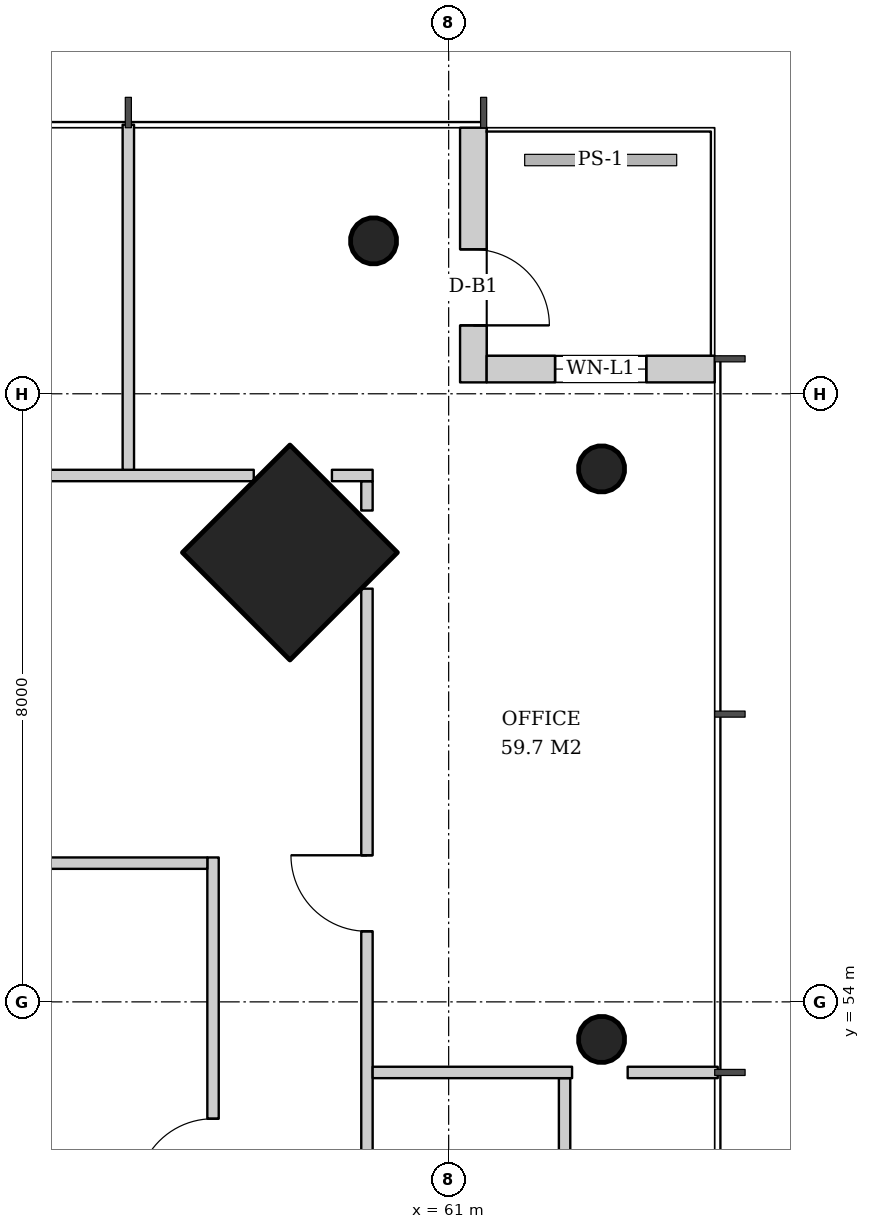
"""IFC4 building model, lengths in metres.
Left out: names, types, materials, properties, quantities, classifications, styles, units other than length and angle.
Written with IfcOpenShell. Run it as: python <this file> out.ifc"""

import sys

from ifc_helpers import new_model, si_unit, direction, frame, frame_2d, origin, origin_2d, place, context, subcontext, project, spatial, rectangle, hollow_circle, extrude, element, fill, save


model = new_model("IFC4")
c1 = context("Model", 3, precision=1e-05, world=origin(), true_north=direction((0.0, 1.0)))
c2 = subcontext(c1, "Body", "Model", "MODEL_VIEW")
j1 = project(units=[si_unit("LENGTHUNIT", "METRE"), si_unit("PLANEANGLEUNIT", "RADIAN")], contexts=[c1])
p1 = place(None, origin())
s1 = spatial("IfcSite", under=j1, at=p1, CompositionType="ELEMENT")
p2 = place(p1, origin())
s2 = spatial("IfcBuilding", under=s1, at=p2, CompositionType="ELEMENT")
p3 = place(p2, frame((0.0, 0.0, 207.2)))
s3 = spatial("IfcBuildingStorey", under=s2, at=p3, CompositionType="ELEMENT", Elevation=207.2)
p4 = place(p3, frame((58.95, 59.95, 0.0), z_axis=(-0.031898107953, -0.031898107953, 0.998981992539), x_axis=(0.707106781187, -0.707106781187, 0.0)))
e1 = element("IfcColumn", 1, at=p4, inside=s3, PredefinedType="COLUMN", context=c2, shape_type="SweptSolid", body=[
    extrude(rectangle(XDim=2.0, YDim=2.0, at=origin_2d()), origin(), (0.0, 0.0, 1.0), 3.804),
])
p5 = place(p3, frame((63.05, 61.05, 0.0), z_axis=(-0.031962158256, -0.031962158256, 0.998977898093), x_axis=(0.707106781187, -0.707106781187, 0.0)))
e2 = element("IfcColumn", 2, at=p5, inside=s3, PredefinedType="COLUMN", context=c2, shape_type="SweptSolid", body=[
    extrude(hollow_circle(Radius=0.305, WallThickness=0.025, at=origin_2d()), origin(), (0.0, 0.0, 1.0), 3.804),
])
p6 = place(p3, frame((63.05, 53.525, 0.0), z_axis=(-0.031974442509, -0.015923015547, 0.999361842679), x_axis=(0.445775033553, -0.895145027055, 0.0)))
e3 = element("IfcColumn", 3, at=p6, inside=s3, PredefinedType="COLUMN", context=c2, shape_type="SweptSolid", body=[
    extrude(hollow_circle(Radius=0.305, WallThickness=0.025, at=origin_2d()), origin(), (0.0, 0.0, 1.0), 3.802),
])
p7 = place(p3, frame((60.05, 64.05, 0.0), z_axis=(-0.031962158256, -0.031962158256, 0.998977898093), x_axis=(0.707106781187, -0.707106781187, 0.0)))
e4 = element("IfcColumn", 4, at=p7, inside=s3, PredefinedType="COLUMN", context=c2, shape_type="SweptSolid", body=[
    extrude(hollow_circle(Radius=0.305, WallThickness=0.025, at=origin_2d()), origin(), (0.0, 0.0, 1.0), 3.804),
])
p8 = place(p3, frame((61.325, 65.5, 0.0), z_axis=(0.0, 0.0, 1.0), x_axis=(0.0, -1.0, 0.0)))
e5 = element("IfcWall", 5, at=p8, inside=s3, PredefinedType="SOLIDWALL", context=c2, shape_type="SweptSolid", body=[
    extrude(rectangle(XDim=3.35, YDim=0.35, at=frame_2d((1.675, 0.0))), origin(), (0.0, 0.0, 1.0), 3.62),
])
p9 = place(p8, frame((1.6, 0.0, 0.0)))
e6 = element("IfcOpeningElement", 6, at=p9, cuts=e5, PredefinedType="OPENING", context=c2, shape_type="SweptSolid", body=[
    extrude(rectangle(XDim=1.0, YDim=2.4, at=frame_2d((0.5, 1.2))), frame((0.0, 0.185, 0.0), z_axis=(0.0, -1.0, 0.0), x_axis=(1.0, 0.0, 0.0)), (0.0, 0.0, 1.0), 0.37),
])
p10 = place(p3, frame((61.5, 62.325, 0.0), z_axis=(0.0, 0.0, 1.0), x_axis=(1.0, 0.0, 0.0)))
e7 = element("IfcWall", 7, at=p10, inside=s3, PredefinedType="SOLIDWALL", context=c2, shape_type="SweptSolid", body=[
    extrude(rectangle(XDim=3.0, YDim=0.35, at=frame_2d((1.5, 0.0))), origin(), (0.0, 0.0, 1.0), 3.62),
])
p11 = place(p10, frame((0.9, 0.0, 0.6)))
e8 = element("IfcOpeningElement", 8, at=p11, cuts=e7, PredefinedType="OPENING", context=c2, shape_type="SweptSolid", body=[
    extrude(rectangle(XDim=1.2, YDim=2.55, at=frame_2d((0.6, 1.275))), frame((0.0, 0.185, 0.0), z_axis=(0.0, -1.0, 0.0), x_axis=(1.0, 0.0, 0.0)), (0.0, 0.0, 1.0), 0.37),
])
p12 = place(p3, frame((57.9, 48.025, 0.0), z_axis=(0.0, 0.0, 1.0), x_axis=(0.0, 1.0, 0.0)))
e9 = element("IfcWall", 9, at=p12, inside=s3, PredefinedType="PARTITIONING", context=c2, shape_type="SweptSolid", body=[
    extrude(rectangle(XDim=7.875, YDim=0.15, at=frame_2d((3.938, 0.0))), origin(), (0.0, 0.0, 1.0), 2.867),
])
p13 = place(p12, frame((3.438, 0.0, 0.0)))
e10 = element("IfcOpeningElement", 10, at=p13, cuts=e9, PredefinedType="OPENING", context=c2, shape_type="SweptSolid", body=[
    extrude(rectangle(XDim=1.0, YDim=2.1, at=frame_2d((0.5, 1.05))), frame((0.0, 0.085, 0.0), z_axis=(0.0, -1.0, 0.0), x_axis=(1.0, 0.0, 0.0)), (0.0, 0.0, 1.0), 0.17),
])
p14 = place(p3, frame((54.9, 55.825, 0.0), z_axis=(0.0, 0.0, 1.0), x_axis=(1.0, 0.0, 0.0)))
e11 = element("IfcWall", 11, at=p14, inside=s3, PredefinedType="PARTITIONING", context=c2, shape_type="SweptSolid", body=[
    extrude(rectangle(XDim=2.925, YDim=0.15, at=frame_2d((1.462, 0.0))), origin(), (0.0, 0.0, 1.0), 3.62),
])
p15 = place(p3, frame((62.525, 48.432, 0.0), z_axis=(0.0, 0.0, 1.0), x_axis=(0.0, 1.0, 0.0)))
e12 = element("IfcWall", 12, at=p15, inside=s3, PredefinedType="PARTITIONING", context=c2, shape_type="SweptSolid", body=[
    extrude(rectangle(XDim=4.564, YDim=0.15, at=frame_2d((2.282, 0.0))), origin(), (0.0, 0.0, 1.0), 2.867),
])
p16 = place(p3, frame((59.925, 32.564, 0.0), z_axis=(0.0, 0.0, 1.0), x_axis=(0.0, 1.0, 0.0)))
e13 = element("IfcWall", 13, at=p16, inside=s3, PredefinedType="PARTITIONING", context=c2, shape_type="SweptSolid", body=[
    extrude(rectangle(XDim=26.872, YDim=0.15, at=frame_2d((13.436, 0.0))), origin(), (0.0, 0.0, 1.0), 2.867),
])
p17 = place(p16, frame((3.507, 0.0, 0.0)))
e14 = element("IfcOpeningElement", 14, at=p17, cuts=e13, PredefinedType="OPENING", context=c2, shape_type="SweptSolid", body=[
    extrude(rectangle(XDim=1.0, YDim=2.1, at=frame_2d((0.5, 1.05))), frame((0.0, 0.085, 0.0), z_axis=(0.0, -1.0, 0.0), x_axis=(1.0, 0.0, 0.0)), (0.0, 0.0, 1.0), 0.17),
])
p18 = place(p16, frame((8.221, 0.0, 0.0)))
e15 = element("IfcOpeningElement", 15, at=p18, cuts=e13, PredefinedType="OPENING", context=c2, shape_type="SweptSolid", body=[
    extrude(rectangle(XDim=1.0, YDim=2.1, at=frame_2d((0.5, 1.05))), frame((0.0, 0.085, 0.0), z_axis=(0.0, -1.0, 0.0), x_axis=(1.0, 0.0, 0.0)), (0.0, 0.0, 1.0), 0.17),
])
p19 = place(p16, frame((12.936, 0.0, 0.0)))
e16 = element("IfcOpeningElement", 16, at=p19, cuts=e13, PredefinedType="OPENING", context=c2, shape_type="SweptSolid", body=[
    extrude(rectangle(XDim=1.0, YDim=2.1, at=frame_2d((0.5, 1.05))), frame((0.0, 0.085, 0.0), z_axis=(0.0, -1.0, 0.0), x_axis=(1.0, 0.0, 0.0)), (0.0, 0.0, 1.0), 0.17),
])
p20 = place(p16, frame((17.65, 0.0, 0.0)))
e17 = element("IfcOpeningElement", 17, at=p20, cuts=e13, PredefinedType="OPENING", context=c2, shape_type="SweptSolid", body=[
    extrude(rectangle(XDim=1.0, YDim=2.1, at=frame_2d((0.5, 1.05))), frame((0.0, 0.085, 0.0), z_axis=(0.0, -1.0, 0.0), x_axis=(1.0, 0.0, 0.0)), (0.0, 0.0, 1.0), 0.17),
])
p21 = place(p16, frame((22.364, 0.0, 0.0)))
e18 = element("IfcOpeningElement", 18, at=p21, cuts=e13, PredefinedType="OPENING", context=c2, shape_type="SweptSolid", body=[
    extrude(rectangle(XDim=1.0, YDim=2.1, at=frame_2d((0.5, 1.05))), frame((0.0, 0.085, 0.0), z_axis=(0.0, -1.0, 0.0), x_axis=(1.0, 0.0, 0.0)), (0.0, 0.0, 1.0), 0.17),
])
p22 = place(p3, frame((59.925, 60.464, 0.0), z_axis=(0.0, 0.0, 1.0), x_axis=(0.0, 1.0, 0.0)))
e19 = element("IfcWall", 19, at=p22, inside=s3, PredefinedType="PARTITIONING", context=c2, shape_type="SweptSolid", body=[
    extrude(rectangle(XDim=0.386, YDim=0.15, at=frame_2d((0.193, 0.0))), origin(), (0.0, 0.0, 1.0), 3.32),
])
p23 = place(p3, frame((60.0, 53.072, 0.0), z_axis=(0.0, 0.0, 1.0), x_axis=(1.0, 0.0, 0.0)))
e20 = element("IfcWall", 20, at=p23, inside=s3, PredefinedType="PARTITIONING", context=c2, shape_type="SweptSolid", body=[
    extrude(rectangle(XDim=2.624, YDim=0.15, at=frame_2d((1.312, 0.0))), origin(), (0.0, 0.0, 1.0), 3.62),
])
p24 = place(p3, frame((63.355, 53.072, 0.0), z_axis=(0.0, 0.0, 1.0), x_axis=(1.0, 0.0, 0.0)))
e21 = element("IfcWall", 21, at=p24, inside=s3, PredefinedType="PARTITIONING", context=c2, shape_type="SweptSolid", body=[
    extrude(rectangle(XDim=1.185, YDim=0.15, at=frame_2d((0.593, 0.0))), origin(), (0.0, 0.0, 1.0), 3.62),
])
p25 = place(p3, frame((60.0, 60.925, 0.0), z_axis=(0.0, 0.0, 1.0), x_axis=(-1.0, 0.0, 0.0)))
e22 = element("IfcWall", 22, at=p25, inside=s3, PredefinedType="PARTITIONING", context=c2, shape_type="SweptSolid", body=[
    extrude(rectangle(XDim=0.536, YDim=0.15, at=frame_2d((0.268, 0.0))), origin(), (0.0, 0.0, 1.0), 3.32),
])
p26 = place(p3, frame((58.436, 60.925, 0.0), z_axis=(0.0, 0.0, 1.0), x_axis=(-1.0, 0.0, 0.0)))
e23 = element("IfcWall", 23, at=p26, inside=s3, PredefinedType="PARTITIONING", context=c2, shape_type="SweptSolid", body=[
    extrude(rectangle(XDim=26.872, YDim=0.15, at=frame_2d((13.436, 0.0))), origin(), (0.0, 0.0, 1.0), 2.867),
])
p27 = place(p26, frame((3.507, 0.0, 0.0)))
e24 = element("IfcOpeningElement", 24, at=p27, cuts=e23, PredefinedType="OPENING", context=c2, shape_type="SweptSolid", body=[
    extrude(rectangle(XDim=1.0, YDim=2.1, at=frame_2d((0.5, 1.05))), frame((0.0, 0.085, 0.0), z_axis=(0.0, -1.0, 0.0), x_axis=(1.0, 0.0, 0.0)), (0.0, 0.0, 1.0), 0.17),
])
p28 = place(p26, frame((8.221, 0.0, 0.0)))
e25 = element("IfcOpeningElement", 25, at=p28, cuts=e23, PredefinedType="OPENING", context=c2, shape_type="SweptSolid", body=[
    extrude(rectangle(XDim=1.0, YDim=2.1, at=frame_2d((0.5, 1.05))), frame((0.0, 0.085, 0.0), z_axis=(0.0, -1.0, 0.0), x_axis=(1.0, 0.0, 0.0)), (0.0, 0.0, 1.0), 0.17),
])
p29 = place(p26, frame((12.536, 0.0, 0.0)))
e26 = element("IfcOpeningElement", 26, at=p29, cuts=e23, PredefinedType="OPENING", context=c2, shape_type="SweptSolid", body=[
    extrude(rectangle(XDim=1.8, YDim=2.4, at=frame_2d((0.9, 1.2))), frame((0.0, 0.085, 0.0), z_axis=(0.0, -1.0, 0.0), x_axis=(1.0, 0.0, 0.0)), (0.0, 0.0, 1.0), 0.17),
])
p30 = place(p26, frame((22.364, 0.0, 0.0)))
e27 = element("IfcOpeningElement", 27, at=p30, cuts=e23, PredefinedType="OPENING", context=c2, shape_type="SweptSolid", body=[
    extrude(rectangle(XDim=1.0, YDim=2.1, at=frame_2d((0.5, 1.05))), frame((0.0, 0.085, 0.0), z_axis=(0.0, -1.0, 0.0), x_axis=(1.0, 0.0, 0.0)), (0.0, 0.0, 1.0), 0.17),
])
p31 = place(p3, frame((56.786, 61.0, 0.0), z_axis=(0.0, 0.0, 1.0), x_axis=(0.0, 1.0, 0.0)))
e28 = element("IfcWall", 28, at=p31, inside=s3, PredefinedType="PARTITIONING", context=c2, shape_type="SweptSolid", body=[
    extrude(rectangle(XDim=4.54, YDim=0.15, at=frame_2d((2.27, 0.0))), origin(), (0.0, 0.0, 1.0), 3.12),
])
p32 = place(p9, origin())
e29 = element("IfcDoor", 29, at=p32, inside=s3, OperationType="SINGLE_SWING_RIGHT", PredefinedType="DOOR", context=c2, shape_type="SweptSolid", body=[
    extrude(rectangle(XDim=1.0, YDim=2.4, at=frame_2d((0.5, 1.2))), frame((0.0, 0.025, 0.0), z_axis=(0.0, -1.0, 0.0), x_axis=(1.0, 0.0, 0.0)), (0.0, 0.0, 1.0), 0.05),
])
fill(e6, e29)
p33 = place(p11, origin())
e30 = element("IfcWindow", 30, at=p33, inside=s3, PartitioningType="SINGLE_PANEL", PredefinedType="WINDOW", context=c2, shape_type="SweptSolid", body=[
    extrude(rectangle(XDim=1.2, YDim=2.55, at=frame_2d((0.6, 1.275))), frame((0.0, 0.03, 0.0), z_axis=(0.0, -1.0, 0.0), x_axis=(1.0, 0.0, 0.0)), (0.0, 0.0, 1.0), 0.06),
])
fill(e8, e30)
p34 = place(p13, origin())
e31 = element("IfcDoor", 31, at=p34, inside=s3, OperationType="SINGLE_SWING_LEFT", PredefinedType="DOOR", context=c2, shape_type="SweptSolid", body=[
    extrude(rectangle(XDim=1.0, YDim=2.1, at=frame_2d((0.5, 1.05))), frame((0.0, 0.025, 0.0), z_axis=(0.0, -1.0, 0.0), x_axis=(1.0, 0.0, 0.0)), (0.0, 0.0, 1.0), 0.05),
])
fill(e10, e31)
p35 = place(p21, origin())
e32 = element("IfcDoor", 32, at=p35, inside=s3, OperationType="SINGLE_SWING_RIGHT", PredefinedType="DOOR", context=c2, shape_type="SweptSolid", body=[
    extrude(rectangle(XDim=1.0, YDim=2.1, at=frame_2d((0.5, 1.05))), frame((0.0, 0.025, 0.0), z_axis=(0.0, -1.0, 0.0), x_axis=(1.0, 0.0, 0.0)), (0.0, 0.0, 1.0), 0.05),
])
fill(e18, e32)
save(model, sys.argv[1])
